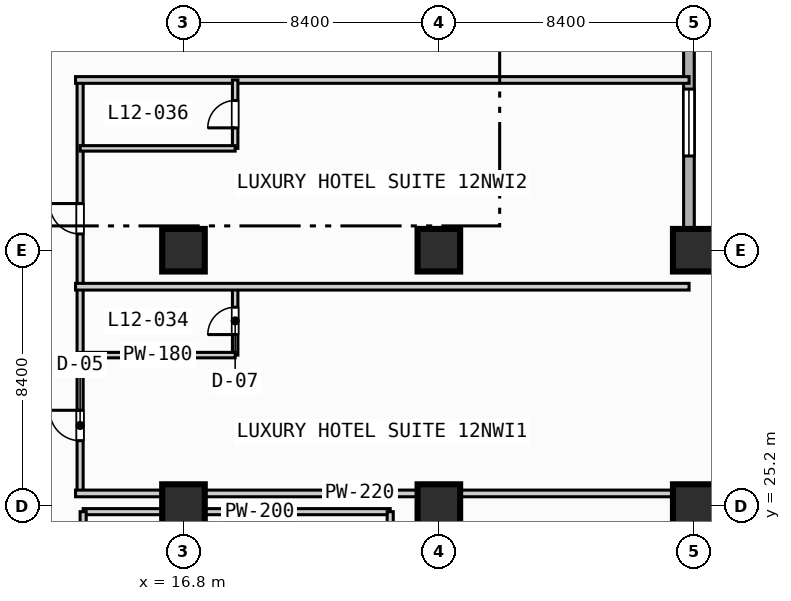
"""IFC4 building model, lengths in metres.
Left out: names, types, materials, properties, quantities, classifications, styles, units other than length and angle.
Written with IfcOpenShell. Run it as: python <this file> out.ifc"""

import sys

from ifc_helpers import new_model, si_unit, direction, frame, frame_2d, origin, origin_2d, place, context, subcontext, project, spatial, rectangle, extrude, element, fill, save


model = new_model("IFC4")
c1 = context("Model", 3, precision=1e-05, world=origin(), true_north=direction((0.0, 1.0)))
c2 = subcontext(c1, "Body", "Model", "MODEL_VIEW")
j1 = project(units=[si_unit("LENGTHUNIT", "METRE"), si_unit("PLANEANGLEUNIT", "RADIAN")], contexts=[c1])
p1 = place(None, origin())
s1 = spatial("IfcSite", under=j1, at=p1, CompositionType="ELEMENT")
p2 = place(p1, origin())
s2 = spatial("IfcBuilding", under=s1, at=p2, CompositionType="ELEMENT")
p3 = place(p2, frame((0.0, 0.0, 54.8)))
s3 = spatial("IfcBuildingStorey", under=s2, at=p3, CompositionType="ELEMENT", Elevation=54.8)
for number, where, z_axis, x_axis in (
    (1, (16.8, 25.2, 0.0), (0.0, 0.0, 1.0), (1.0, 0.0, 0.0)),
    (2, (16.8, 33.6, 0.0), (0.0, 0.0, 1.0), (1.0, 0.0, 0.0)),
    (3, (25.2, 25.2, 0.0), (0.0, 0.0, 1.0), (1.0, 0.0, 0.0)),
    (4, (25.2, 33.6, 0.0), (0.0, 0.0, 1.0), (1.0, 0.0, 0.0)),
    (5, (33.6, 25.2, 0.0), (0.0, 0.0, 1.0), (1.0, 0.0, 0.0)),
    (6, (33.6, 33.6, 0.0), (0.0, 0.0, 1.0), (1.0, 0.0, 0.0)),
):
    element("IfcColumn", number, at=place(p3, frame(where, z_axis=z_axis, x_axis=x_axis)), inside=s3, PredefinedType="COLUMN", context=c2, shape_type="SweptSolid", body=[
        extrude(rectangle(XDim=1.4, YDim=1.4, at=origin_2d()), origin(), (0.0, 0.0, 1.0), 3.8),
    ])
p4 = place(p3, frame((33.425, 89.225, 0.0), z_axis=(0.0, 0.0, 1.0), x_axis=(0.0, -1.0, 0.0)))
e7 = element("IfcWall", 7, at=p4, inside=s3, PredefinedType="STANDARD", context=c2, shape_type="SweptSolid", body=[
    extrude(rectangle(XDim=55.8, YDim=0.35, at=frame_2d((27.9, 0.0))), origin(), (0.0, 0.0, 1.0), 3.55),
])
p5 = place(p4, frame((50.325, 0.0, 0.85)))
e8 = element("IfcOpeningElement", 8, at=p5, cuts=e7, PredefinedType="OPENING", context=c2, shape_type="SweptSolid", body=[
    extrude(rectangle(XDim=2.2, YDim=1.8, at=frame_2d((1.1, 0.9))), frame((0.0, 0.185, 0.0), z_axis=(0.0, -1.0, 0.0), x_axis=(1.0, 0.0, 0.0)), (0.0, 0.0, 1.0), 0.37),
])
p6 = place(p3, frame((33.425, 33.425, 0.0), z_axis=(0.0, 0.0, 1.0), x_axis=(1.0, 0.0, 0.0)))
e9 = element("IfcWall", 9, at=p6, inside=s3, PredefinedType="STANDARD", context=c2, shape_type="SweptSolid", body=[
    extrude(rectangle(XDim=55.8, YDim=0.35, at=frame_2d((27.9, 0.0))), origin(), (0.0, 0.0, 1.0), 3.55),
])
p7 = place(p6, frame((12.075, 0.0, 0.0)))
e10 = element("IfcOpeningElement", 10, at=p7, cuts=e9, PredefinedType="OPENING", context=c2, shape_type="SweptSolid", body=[
    extrude(rectangle(XDim=1.4, YDim=2.2, at=frame_2d((0.7, 1.1))), frame((0.0, 0.185, 0.0), z_axis=(0.0, -1.0, 0.0), x_axis=(1.0, 0.0, 0.0)), (0.0, 0.0, 1.0), 0.37),
])
p8 = place(p6, frame((36.875, 0.0, 0.85)))
e11 = element("IfcOpeningElement", 11, at=p8, cuts=e9, PredefinedType="OPENING", context=c2, shape_type="SweptSolid", body=[
    extrude(rectangle(XDim=2.2, YDim=1.8, at=frame_2d((1.1, 0.9))), frame((0.0, 0.185, 0.0), z_axis=(0.0, -1.0, 0.0), x_axis=(1.0, 0.0, 0.0)), (0.0, 0.0, 1.0), 0.37),
])
p9 = place(p6, frame((45.275, 0.0, 0.85)))
e12 = element("IfcOpeningElement", 12, at=p9, cuts=e9, PredefinedType="OPENING", context=c2, shape_type="SweptSolid", body=[
    extrude(rectangle(XDim=2.2, YDim=1.8, at=frame_2d((1.1, 0.9))), frame((0.0, 0.185, 0.0), z_axis=(0.0, -1.0, 0.0), x_axis=(1.0, 0.0, 0.0)), (0.0, 0.0, 1.0), 0.37),
])
p10 = place(p3, frame((18.7, 13.65, 0.0), z_axis=(0.0, 0.0, 1.0), x_axis=(0.0, 1.0, 0.0)))
e13 = element("IfcWall", 13, at=p10, inside=s3, PredefinedType="PARTITIONING", context=c2, shape_type="SweptSolid", body=[
    extrude(rectangle(XDim=11.35, YDim=0.16, at=frame_2d((5.675, 0.0))), origin(), (0.0, 0.0, 1.0), 3.55),
])
p11 = place(p3, frame((13.5, 25.0, 0.0), z_axis=(0.0, 0.0, 1.0), x_axis=(1.0, 0.0, 0.0)))
e14 = element("IfcWall", 14, at=p11, inside=s3, PredefinedType="PARTITIONING", context=c2, shape_type="SweptSolid", body=[
    extrude(rectangle(XDim=10.1, YDim=0.2, at=frame_2d((5.05, 0.0))), origin(), (0.0, 0.0, 1.0), 2.8),
])
for number, where, z_axis, x_axis in (
    (15, (13.5, 13.65, 0.0), (0.0, 0.0, 1.0), (0.0, 1.0, 0.0)),
    (16, (23.6, 13.65, 0.0), (0.0, 0.0, 1.0), (0.0, 1.0, 0.0)),
):
    element("IfcWall", number, at=place(p3, frame(where, z_axis=z_axis, x_axis=x_axis)), inside=s3, PredefinedType="PARTITIONING", context=c2, shape_type="SweptSolid", body=[
        extrude(rectangle(XDim=11.35, YDim=0.2, at=frame_2d((5.675, 0.0))), origin(), (0.0, 0.0, 1.0), 3.55),
    ])
p12 = place(p3, frame((13.4, 25.6, 0.0), z_axis=(0.0, 0.0, 1.0), x_axis=(0.0, 1.0, 0.0)))
e17 = element("IfcWall", 17, at=p12, inside=s3, PredefinedType="PARTITIONING", context=c2, shape_type="SweptSolid", body=[
    extrude(rectangle(XDim=13.6, YDim=0.2, at=frame_2d((6.8, 0.0))), origin(), (0.0, 0.0, 1.0), 3.55),
])
p13 = place(p12, frame((1.735, 0.0, 0.0)))
e18 = element("IfcOpeningElement", 18, at=p13, cuts=e17, PredefinedType="OPENING", context=c2, shape_type="SweptSolid", body=[
    extrude(rectangle(XDim=1.0, YDim=2.15, at=frame_2d((0.5, 1.075))), frame((0.0, 0.11, 0.0), z_axis=(0.0, -1.0, 0.0), x_axis=(1.0, 0.0, 0.0)), (0.0, 0.0, 1.0), 0.22),
])
p14 = place(p12, frame((8.535, 0.0, 0.0)))
e19 = element("IfcOpeningElement", 19, at=p14, cuts=e17, PredefinedType="OPENING", context=c2, shape_type="SweptSolid", body=[
    extrude(rectangle(XDim=1.0, YDim=2.15, at=frame_2d((0.5, 1.075))), frame((0.0, 0.11, 0.0), z_axis=(0.0, -1.0, 0.0), x_axis=(1.0, 0.0, 0.0)), (0.0, 0.0, 1.0), 0.22),
])
p15 = place(p3, frame((13.25, 25.6, 0.0), z_axis=(0.0, 0.0, 1.0), x_axis=(1.0, 0.0, 0.0)))
e20 = element("IfcWall", 20, at=p15, inside=s3, PredefinedType="PARTITIONING", context=c2, shape_type="SweptSolid", body=[
    extrude(rectangle(XDim=20.18, YDim=0.22, at=frame_2d((10.09, 0.0))), origin(), (0.0, 0.0, 1.0), 3.55),
])
p16 = place(p3, frame((18.5, 30.15, 0.0), z_axis=(0.0, 0.0, 1.0), x_axis=(0.0, 1.0, 0.0)))
e21 = element("IfcWall", 21, at=p16, inside=s3, PredefinedType="PLUMBINGWALL", context=c2, shape_type="SweptSolid", body=[
    extrude(rectangle(XDim=2.25, YDim=0.18, at=frame_2d((1.125, 0.0))), origin(), (0.0, 0.0, 1.0), 3.55),
])
p17 = place(p16, frame((0.675, 0.0, 0.0)))
e22 = element("IfcOpeningElement", 22, at=p17, cuts=e21, PredefinedType="OPENING", context=c2, shape_type="SweptSolid", body=[
    extrude(rectangle(XDim=0.9, YDim=2.1, at=frame_2d((0.45, 1.05))), frame((0.0, 0.1, 0.0), z_axis=(0.0, -1.0, 0.0), x_axis=(1.0, 0.0, 0.0)), (0.0, 0.0, 1.0), 0.2),
])
p18 = place(p3, frame((13.4, 30.15, 0.0), z_axis=(0.0, 0.0, 1.0), x_axis=(1.0, 0.0, 0.0)))
e23 = element("IfcWall", 23, at=p18, inside=s3, PredefinedType="PLUMBINGWALL", context=c2, shape_type="SweptSolid", body=[
    extrude(rectangle(XDim=5.1, YDim=0.18, at=frame_2d((2.55, 0.0))), origin(), (0.0, 0.0, 1.0), 3.55),
])
for number, where, z_axis, x_axis in (
    (24, (13.25, 32.4, 0.0), (0.0, 0.0, 1.0), (1.0, 0.0, 0.0)),
    (25, (13.25, 39.2, 0.0), (0.0, 0.0, 1.0), (1.0, 0.0, 0.0)),
):
    element("IfcWall", number, at=place(p3, frame(where, z_axis=z_axis, x_axis=x_axis)), inside=s3, PredefinedType="PARTITIONING", context=c2, shape_type="SweptSolid", body=[
        extrude(rectangle(XDim=20.18, YDim=0.22, at=frame_2d((10.09, 0.0))), origin(), (0.0, 0.0, 1.0), 3.55),
    ])
p19 = place(p3, frame((18.5, 36.95, 0.0), z_axis=(0.0, 0.0, 1.0), x_axis=(0.0, 1.0, 0.0)))
e26 = element("IfcWall", 26, at=p19, inside=s3, PredefinedType="PLUMBINGWALL", context=c2, shape_type="SweptSolid", body=[
    extrude(rectangle(XDim=2.25, YDim=0.18, at=frame_2d((1.125, 0.0))), origin(), (0.0, 0.0, 1.0), 3.55),
])
p20 = place(p19, frame((0.675, 0.0, 0.0)))
e27 = element("IfcOpeningElement", 27, at=p20, cuts=e26, PredefinedType="OPENING", context=c2, shape_type="SweptSolid", body=[
    extrude(rectangle(XDim=0.9, YDim=2.1, at=frame_2d((0.45, 1.05))), frame((0.0, 0.1, 0.0), z_axis=(0.0, -1.0, 0.0), x_axis=(1.0, 0.0, 0.0)), (0.0, 0.0, 1.0), 0.2),
])
p21 = place(p3, frame((13.4, 36.95, 0.0), z_axis=(0.0, 0.0, 1.0), x_axis=(1.0, 0.0, 0.0)))
e28 = element("IfcWall", 28, at=p21, inside=s3, PredefinedType="PLUMBINGWALL", context=c2, shape_type="SweptSolid", body=[
    extrude(rectangle(XDim=5.1, YDim=0.18, at=frame_2d((2.55, 0.0))), origin(), (0.0, 0.0, 1.0), 3.55),
])
p22 = place(p5, origin())
e29 = element("IfcWindow", 29, at=p22, inside=s3, PartitioningType="SINGLE_PANEL", PredefinedType="WINDOW", context=c2, shape_type="SweptSolid", body=[
    extrude(rectangle(XDim=2.2, YDim=1.8, at=frame_2d((1.1, 0.9))), frame((0.0, 0.03, 0.0), z_axis=(0.0, -1.0, 0.0), x_axis=(1.0, 0.0, 0.0)), (0.0, 0.0, 1.0), 0.06),
])
fill(e8, e29)
p23 = place(p13, origin())
e30 = element("IfcDoor", 30, at=p23, inside=s3, OperationType="SINGLE_SWING_RIGHT", PredefinedType="DOOR", context=c2, shape_type="SweptSolid", body=[
    extrude(rectangle(XDim=1.0, YDim=2.15, at=frame_2d((0.5, 1.075))), frame((0.0, 0.025, 0.0), z_axis=(0.0, -1.0, 0.0), x_axis=(1.0, 0.0, 0.0)), (0.0, 0.0, 1.0), 0.05),
])
fill(e18, e30)
p24 = place(p14, origin())
e31 = element("IfcDoor", 31, at=p24, inside=s3, OperationType="SINGLE_SWING_RIGHT", PredefinedType="DOOR", context=c2, shape_type="SweptSolid", body=[
    extrude(rectangle(XDim=1.0, YDim=2.15, at=frame_2d((0.5, 1.075))), frame((0.0, 0.025, 0.0), z_axis=(0.0, -1.0, 0.0), x_axis=(1.0, 0.0, 0.0)), (0.0, 0.0, 1.0), 0.05),
])
fill(e19, e31)
p25 = place(p17, origin())
e32 = element("IfcDoor", 32, at=p25, inside=s3, OperationType="SINGLE_SWING_LEFT", PredefinedType="DOOR", context=c2, shape_type="SweptSolid", body=[
    extrude(rectangle(XDim=0.9, YDim=2.1, at=frame_2d((0.45, 1.05))), frame((0.0, 0.025, 0.0), z_axis=(0.0, -1.0, 0.0), x_axis=(1.0, 0.0, 0.0)), (0.0, 0.0, 1.0), 0.05),
])
fill(e22, e32)
p26 = place(p20, origin())
e33 = element("IfcDoor", 33, at=p26, inside=s3, OperationType="SINGLE_SWING_LEFT", PredefinedType="DOOR", context=c2, shape_type="SweptSolid", body=[
    extrude(rectangle(XDim=0.9, YDim=2.1, at=frame_2d((0.45, 1.05))), frame((0.0, 0.025, 0.0), z_axis=(0.0, -1.0, 0.0), x_axis=(1.0, 0.0, 0.0)), (0.0, 0.0, 1.0), 0.05),
])
fill(e27, e33)
save(model, sys.argv[1])
